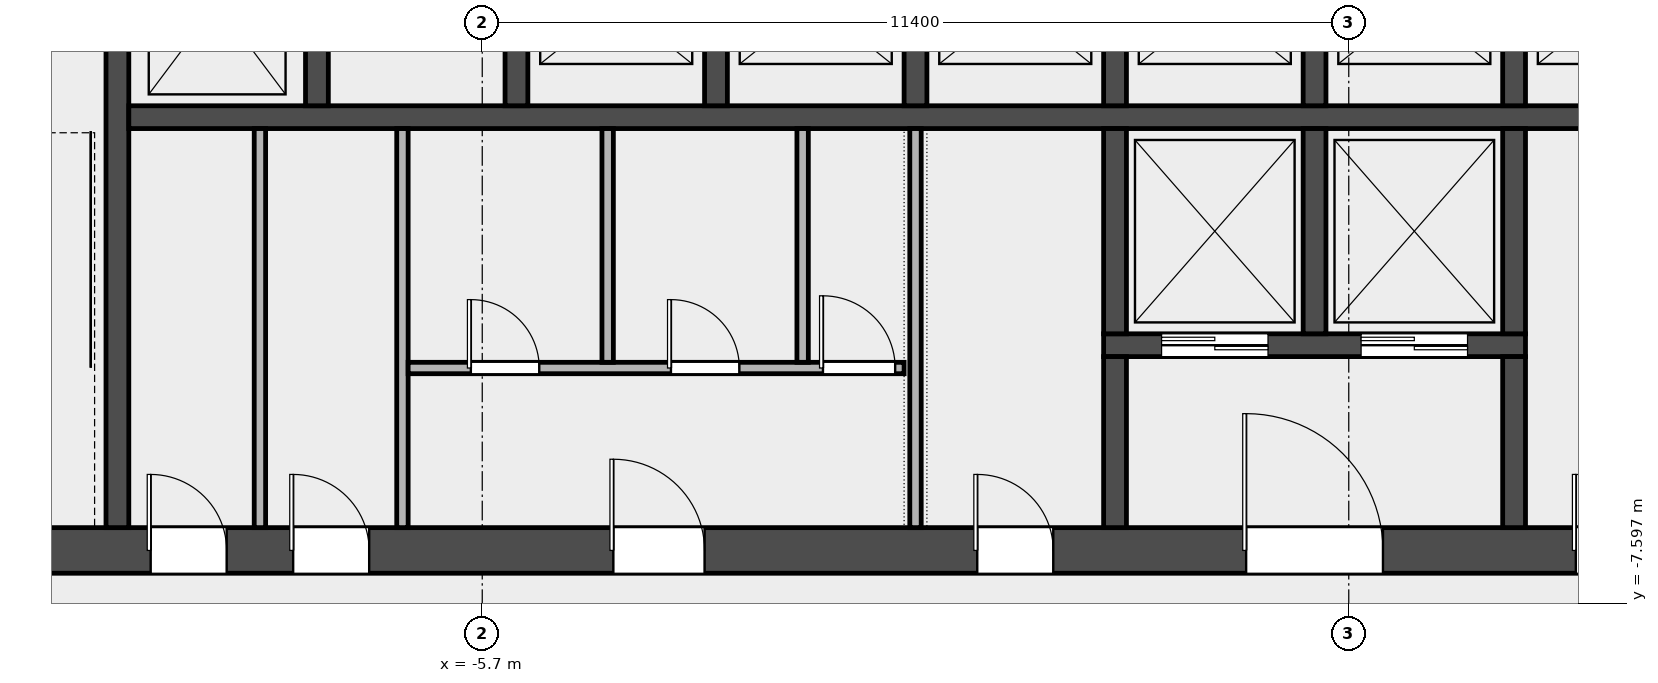
"""IFC4 building model, lengths in metres.
Left out: names, types, materials, properties, quantities, classifications, styles, units other than length and angle.
Written with IfcOpenShell. Run it as: python <this file> out.ifc"""

import sys

from ifc_helpers import new_model, si_unit, direction, frame, frame_2d, origin, place, context, subcontext, project, spatial, rectangle, extrude, element, fill, save


model = new_model("IFC4")
c1 = context("Model", 3, precision=1e-05, world=origin(), true_north=direction((0.0, 1.0)))
c2 = subcontext(c1, "Body", "Model", "MODEL_VIEW")
j1 = project(units=[si_unit("LENGTHUNIT", "METRE"), si_unit("PLANEANGLEUNIT", "RADIAN")], contexts=[c1])
p1 = place(None, origin())
s1 = spatial("IfcSite", under=j1, at=p1, CompositionType="ELEMENT")
p2 = place(p1, origin())
s2 = spatial("IfcBuilding", under=s1, at=p2, CompositionType="ELEMENT")
p3 = place(p2, frame((0.0, 0.0, 148.6)))
s3 = spatial("IfcBuildingStorey", under=s2, at=p3, CompositionType="ELEMENT", Elevation=148.6)
p4 = place(p3, frame((-14.4, -6.9, 0.0), z_axis=(0.0, 0.0, 1.0), x_axis=(1.0, 0.0, 0.0)))
e1 = element("IfcWall", 1, at=p4, inside=s3, PredefinedType="SHEAR", context=c2, shape_type="SweptSolid", body=[
    extrude(rectangle(XDim=28.8, YDim=0.6, at=frame_2d((14.4, 0.0))), origin(), (0.0, 0.0, 1.0), 8.1),
])
p5 = place(p4, frame((4.337, 0.0, 0.0)))
e2 = element("IfcOpeningElement", 2, at=p5, cuts=e1, PredefinedType="OPENING", context=c2, shape_type="SweptSolid", body=[
    extrude(rectangle(XDim=1.0, YDim=2.1, at=frame_2d((0.5, 1.05))), frame((0.0, 0.312, 0.0), z_axis=(0.0, -1.0, 0.0), x_axis=(1.0, 0.0, 0.0)), (0.0, 0.0, 1.0), 0.624),
])
p6 = place(p4, frame((6.212, 0.0, 0.0)))
e3 = element("IfcOpeningElement", 3, at=p6, cuts=e1, PredefinedType="OPENING", context=c2, shape_type="SweptSolid", body=[
    extrude(rectangle(XDim=1.0, YDim=2.1, at=frame_2d((0.5, 1.05))), frame((0.0, 0.312, 0.0), z_axis=(0.0, -1.0, 0.0), x_axis=(1.0, 0.0, 0.0)), (0.0, 0.0, 1.0), 0.624),
])
p7 = place(p4, frame((10.425, 0.0, 0.0)))
e4 = element("IfcOpeningElement", 4, at=p7, cuts=e1, PredefinedType="OPENING", context=c2, shape_type="SweptSolid", body=[
    extrude(rectangle(XDim=1.2, YDim=2.1, at=frame_2d((0.6, 1.05))), frame((0.0, 0.312, 0.0), z_axis=(0.0, -1.0, 0.0), x_axis=(1.0, 0.0, 0.0)), (0.0, 0.0, 1.0), 0.624),
])
p8 = place(p4, frame((15.212, 0.0, 0.0)))
e5 = element("IfcOpeningElement", 5, at=p8, cuts=e1, PredefinedType="OPENING", context=c2, shape_type="SweptSolid", body=[
    extrude(rectangle(XDim=1.0, YDim=2.1, at=frame_2d((0.5, 1.05))), frame((0.0, 0.312, 0.0), z_axis=(0.0, -1.0, 0.0), x_axis=(1.0, 0.0, 0.0)), (0.0, 0.0, 1.0), 0.624),
])
p9 = place(p4, frame((18.75, 0.0, 0.0)))
e6 = element("IfcOpeningElement", 6, at=p9, cuts=e1, PredefinedType="OPENING", context=c2, shape_type="SweptSolid", body=[
    extrude(rectangle(XDim=1.8, YDim=2.1, at=frame_2d((0.9, 1.05))), frame((0.0, 0.312, 0.0), z_axis=(0.0, -1.0, 0.0), x_axis=(1.0, 0.0, 0.0)), (0.0, 0.0, 1.0), 0.624),
])
p10 = place(p4, frame((23.087, 0.0, 0.0)))
e7 = element("IfcOpeningElement", 7, at=p10, cuts=e1, PredefinedType="OPENING", context=c2, shape_type="SweptSolid", body=[
    extrude(rectangle(XDim=1.0, YDim=2.1, at=frame_2d((0.5, 1.05))), frame((0.0, 0.312, 0.0), z_axis=(0.0, -1.0, 0.0), x_axis=(1.0, 0.0, 0.0)), (0.0, 0.0, 1.0), 0.624),
])
p11 = place(p3, frame((-10.5, -6.6, 0.0), z_axis=(0.0, 0.0, 1.0), x_axis=(0.0, 1.0, 0.0)))
e8 = element("IfcWall", 8, at=p11, inside=s3, PredefinedType="SHEAR", context=c2, shape_type="SweptSolid", body=[
    extrude(rectangle(XDim=8.55, YDim=0.3, at=frame_2d((4.275, 0.0))), origin(), (0.0, 0.0, 1.0), 8.1),
])
p12 = place(p3, frame((-10.35, -1.2, 0.0), z_axis=(0.0, 0.0, 1.0), x_axis=(1.0, 0.0, 0.0)))
e9 = element("IfcWall", 9, at=p12, inside=s3, PredefinedType="SOLIDWALL", context=c2, shape_type="SweptSolid", body=[
    extrude(rectangle(XDim=20.7, YDim=0.3, at=frame_2d((10.35, 0.0))), origin(), (0.0, 0.0, 1.0), 8.1),
])
for number, where, z_axis, x_axis in (
    (10, (-7.875, -1.05, 0.0), (0.0, 0.0, 1.0), (0.0, 1.0, 0.0)),
    (11, (-5.25, -1.05, 0.0), (0.0, 0.0, 1.0), (0.0, 1.0, 0.0)),
    (12, (-2.625, -1.05, 0.0), (0.0, 0.0, 1.0), (0.0, 1.0, 0.0)),
    (13, (0.0, -1.05, 0.0), (0.0, 0.0, 1.0), (0.0, 1.0, 0.0)),
    (14, (2.625, -1.05, 0.0), (0.0, 0.0, 1.0), (0.0, 1.0, 0.0)),
    (15, (5.25, -1.05, 0.0), (0.0, 0.0, 1.0), (0.0, 1.0, 0.0)),
    (16, (7.875, -1.05, 0.0), (0.0, 0.0, 1.0), (0.0, 1.0, 0.0)),
):
    element("IfcWall", number, at=place(p3, frame(where, z_axis=z_axis, x_axis=x_axis)), inside=s3, PredefinedType="SOLIDWALL", context=c2, shape_type="SweptSolid", body=[
        extrude(rectangle(XDim=2.7, YDim=0.3, at=frame_2d((1.35, 0.0))), origin(), (0.0, 0.0, 1.0), 8.1),
    ])
p13 = place(p3, frame((2.475, -4.2, 0.0), z_axis=(0.0, 0.0, 1.0), x_axis=(1.0, 0.0, 0.0)))
e17 = element("IfcWall", 17, at=p13, inside=s3, PredefinedType="SOLIDWALL", context=c2, shape_type="SweptSolid", body=[
    extrude(rectangle(XDim=5.55, YDim=0.3, at=frame_2d((2.775, 0.0))), origin(), (0.0, 0.0, 1.0), 8.1),
])
p14 = place(p13, frame((0.762, 0.0, 0.0)))
e18 = element("IfcOpeningElement", 18, at=p14, cuts=e17, PredefinedType="OPENING", context=c2, shape_type="SweptSolid", body=[
    extrude(rectangle(XDim=1.4, YDim=2.1, at=frame_2d((0.7, 1.05))), frame((0.0, 0.162, 0.0), z_axis=(0.0, -1.0, 0.0), x_axis=(1.0, 0.0, 0.0)), (0.0, 0.0, 1.0), 0.324),
])
p15 = place(p13, frame((3.387, 0.0, 0.0)))
e19 = element("IfcOpeningElement", 19, at=p15, cuts=e17, PredefinedType="OPENING", context=c2, shape_type="SweptSolid", body=[
    extrude(rectangle(XDim=1.4, YDim=2.1, at=frame_2d((0.7, 1.05))), frame((0.0, 0.162, 0.0), z_axis=(0.0, -1.0, 0.0), x_axis=(1.0, 0.0, 0.0)), (0.0, 0.0, 1.0), 0.324),
])
p16 = place(p3, frame((2.625, -4.05, 0.0), z_axis=(0.0, 0.0, 1.0), x_axis=(0.0, 1.0, 0.0)))
e20 = element("IfcWall", 20, at=p16, inside=s3, PredefinedType="SOLIDWALL", context=c2, shape_type="SweptSolid", body=[
    extrude(rectangle(XDim=2.7, YDim=0.3, at=frame_2d((1.35, 0.0))), origin(), (0.0, 0.0, 1.0), 8.1),
])
p17 = place(p3, frame((2.625, -6.6, 0.0), z_axis=(0.0, 0.0, 1.0), x_axis=(0.0, 1.0, 0.0)))
e21 = element("IfcWall", 21, at=p17, inside=s3, PredefinedType="SOLIDWALL", context=c2, shape_type="SweptSolid", body=[
    extrude(rectangle(XDim=2.25, YDim=0.3, at=frame_2d((1.125, 0.0))), origin(), (0.0, 0.0, 1.0), 8.1),
])
for number, where, z_axis, x_axis in (
    (22, (5.25, -4.05, 0.0), (0.0, 0.0, 1.0), (0.0, 1.0, 0.0)),
    (23, (7.875, -4.05, 0.0), (0.0, 0.0, 1.0), (0.0, 1.0, 0.0)),
):
    element("IfcWall", number, at=place(p3, frame(where, z_axis=z_axis, x_axis=x_axis)), inside=s3, PredefinedType="SOLIDWALL", context=c2, shape_type="SweptSolid", body=[
        extrude(rectangle(XDim=2.7, YDim=0.3, at=frame_2d((1.35, 0.0))), origin(), (0.0, 0.0, 1.0), 8.1),
    ])
p18 = place(p3, frame((7.875, -6.6, 0.0), z_axis=(0.0, 0.0, 1.0), x_axis=(0.0, 1.0, 0.0)))
e24 = element("IfcWall", 24, at=p18, inside=s3, PredefinedType="SOLIDWALL", context=c2, shape_type="SweptSolid", body=[
    extrude(rectangle(XDim=2.25, YDim=0.3, at=frame_2d((1.125, 0.0))), origin(), (0.0, 0.0, 1.0), 8.1),
])
for number, where, z_axis, x_axis in (
    (25, (-8.625, -6.6, 0.0), (0.0, 0.0, 1.0), (0.0, 1.0, 0.0)),
    (26, (-6.75, -6.6, 0.0), (0.0, 0.0, 1.0), (0.0, 1.0, 0.0)),
):
    element("IfcWall", number, at=place(p3, frame(where, z_axis=z_axis, x_axis=x_axis)), inside=s3, PredefinedType="PARTITIONING", context=c2, shape_type="SweptSolid", body=[
        extrude(rectangle(XDim=5.25, YDim=0.15, at=frame_2d((2.625, 0.0))), origin(), (0.0, 0.0, 1.0), 8.1),
    ])
p19 = place(p3, frame((-6.675, -4.5, 0.0), z_axis=(0.0, 0.0, 1.0), x_axis=(1.0, 0.0, 0.0)))
e27 = element("IfcWall", 27, at=p19, inside=s3, PredefinedType="PARTITIONING", context=c2, shape_type="SweptSolid", body=[
    extrude(rectangle(XDim=6.525, YDim=0.15, at=frame_2d((3.263, 0.0))), origin(), (0.0, 0.0, 1.0), 8.1),
])
p20 = place(p19, frame((0.825, 0.0, 0.0)))
e28 = element("IfcOpeningElement", 28, at=p20, cuts=e27, PredefinedType="OPENING", context=c2, shape_type="SweptSolid", body=[
    extrude(rectangle(XDim=0.9, YDim=2.1, at=frame_2d((0.45, 1.05))), frame((0.0, 0.087, 0.0), z_axis=(0.0, -1.0, 0.0), x_axis=(1.0, 0.0, 0.0)), (0.0, 0.0, 1.0), 0.174),
])
p21 = place(p19, frame((3.458, 0.0, 0.0)))
e29 = element("IfcOpeningElement", 29, at=p21, cuts=e27, PredefinedType="OPENING", context=c2, shape_type="SweptSolid", body=[
    extrude(rectangle(XDim=0.9, YDim=2.1, at=frame_2d((0.45, 1.05))), frame((0.0, 0.087, 0.0), z_axis=(0.0, -1.0, 0.0), x_axis=(1.0, 0.0, 0.0)), (0.0, 0.0, 1.0), 0.174),
])
p22 = place(p19, frame((5.458, 0.0, 0.0)))
e30 = element("IfcOpeningElement", 30, at=p22, cuts=e27, PredefinedType="OPENING", context=c2, shape_type="SweptSolid", body=[
    extrude(rectangle(XDim=0.95, YDim=2.1, at=frame_2d((0.475, 1.05))), frame((0.0, 0.087, 0.0), z_axis=(0.0, -1.0, 0.0), x_axis=(1.0, 0.0, 0.0)), (0.0, 0.0, 1.0), 0.174),
])
for number, where, z_axis, x_axis in (
    (31, (-4.05, -4.425, 0.0), (0.0, 0.0, 1.0), (0.0, 1.0, 0.0)),
    (32, (-1.485, -4.425, 0.0), (0.0, 0.0, 1.0), (0.0, 1.0, 0.0)),
):
    element("IfcWall", number, at=place(p3, frame(where, z_axis=z_axis, x_axis=x_axis)), inside=s3, PredefinedType="PARTITIONING", context=c2, shape_type="SweptSolid", body=[
        extrude(rectangle(XDim=3.075, YDim=0.15, at=frame_2d((1.538, 0.0))), origin(), (0.0, 0.0, 1.0), 8.1),
    ])
p23 = place(p3, frame((0.0, -6.6, 0.0), z_axis=(0.0, 0.0, 1.0), x_axis=(0.0, 1.0, 0.0)))
e33 = element("IfcWall", 33, at=p23, inside=s3, PredefinedType="PARTITIONING", context=c2, shape_type="SweptSolid", body=[
    extrude(rectangle(XDim=5.25, YDim=0.15, at=frame_2d((2.625, 0.0))), origin(), (0.0, 0.0, 1.0), 8.1),
])
p24 = place(p14, origin())
e34 = element("IfcDoor", 34, at=p24, inside=s3, OperationType="DOUBLE_DOOR_SLIDING", PredefinedType="DOOR", context=c2, shape_type="SweptSolid", body=[
    extrude(rectangle(XDim=1.4, YDim=2.1, at=frame_2d((0.7, 1.05))), frame((0.0, 0.025, 0.0), z_axis=(0.0, -1.0, 0.0), x_axis=(1.0, 0.0, 0.0)), (0.0, 0.0, 1.0), 0.05),
])
fill(e18, e34)
p25 = place(p15, origin())
e35 = element("IfcDoor", 35, at=p25, inside=s3, OperationType="DOUBLE_DOOR_SLIDING", PredefinedType="DOOR", context=c2, shape_type="SweptSolid", body=[
    extrude(rectangle(XDim=1.4, YDim=2.1, at=frame_2d((0.7, 1.05))), frame((0.0, 0.025, 0.0), z_axis=(0.0, -1.0, 0.0), x_axis=(1.0, 0.0, 0.0)), (0.0, 0.0, 1.0), 0.05),
])
fill(e19, e35)
p26 = place(p5, origin())
e36 = element("IfcDoor", 36, at=p26, inside=s3, OperationType="SINGLE_SWING_LEFT", PredefinedType="DOOR", context=c2, shape_type="SweptSolid", body=[
    extrude(rectangle(XDim=1.0, YDim=2.1, at=frame_2d((0.5, 1.05))), frame((0.0, 0.025, 0.0), z_axis=(0.0, -1.0, 0.0), x_axis=(1.0, 0.0, 0.0)), (0.0, 0.0, 1.0), 0.05),
])
fill(e2, e36)
p27 = place(p6, origin())
e37 = element("IfcDoor", 37, at=p27, inside=s3, OperationType="SINGLE_SWING_LEFT", PredefinedType="DOOR", context=c2, shape_type="SweptSolid", body=[
    extrude(rectangle(XDim=1.0, YDim=2.1, at=frame_2d((0.5, 1.05))), frame((0.0, 0.025, 0.0), z_axis=(0.0, -1.0, 0.0), x_axis=(1.0, 0.0, 0.0)), (0.0, 0.0, 1.0), 0.05),
])
fill(e3, e37)
p28 = place(p7, origin())
e38 = element("IfcDoor", 38, at=p28, inside=s3, OperationType="SINGLE_SWING_LEFT", PredefinedType="DOOR", context=c2, shape_type="SweptSolid", body=[
    extrude(rectangle(XDim=1.2, YDim=2.1, at=frame_2d((0.6, 1.05))), frame((0.0, 0.025, 0.0), z_axis=(0.0, -1.0, 0.0), x_axis=(1.0, 0.0, 0.0)), (0.0, 0.0, 1.0), 0.05),
])
fill(e4, e38)
p29 = place(p20, origin())
e39 = element("IfcDoor", 39, at=p29, inside=s3, OperationType="SINGLE_SWING_LEFT", PredefinedType="DOOR", context=c2, shape_type="SweptSolid", body=[
    extrude(rectangle(XDim=0.9, YDim=2.1, at=frame_2d((0.45, 1.05))), frame((0.0, 0.025, 0.0), z_axis=(0.0, -1.0, 0.0), x_axis=(1.0, 0.0, 0.0)), (0.0, 0.0, 1.0), 0.05),
])
fill(e28, e39)
p30 = place(p21, origin())
e40 = element("IfcDoor", 40, at=p30, inside=s3, OperationType="SINGLE_SWING_LEFT", PredefinedType="DOOR", context=c2, shape_type="SweptSolid", body=[
    extrude(rectangle(XDim=0.9, YDim=2.1, at=frame_2d((0.45, 1.05))), frame((0.0, 0.025, 0.0), z_axis=(0.0, -1.0, 0.0), x_axis=(1.0, 0.0, 0.0)), (0.0, 0.0, 1.0), 0.05),
])
fill(e29, e40)
p31 = place(p22, origin())
e41 = element("IfcDoor", 41, at=p31, inside=s3, OperationType="SINGLE_SWING_LEFT", PredefinedType="DOOR", context=c2, shape_type="SweptSolid", body=[
    extrude(rectangle(XDim=0.95, YDim=2.1, at=frame_2d((0.475, 1.05))), frame((0.0, 0.025, 0.0), z_axis=(0.0, -1.0, 0.0), x_axis=(1.0, 0.0, 0.0)), (0.0, 0.0, 1.0), 0.05),
])
fill(e30, e41)
p32 = place(p8, origin())
e42 = element("IfcDoor", 42, at=p32, inside=s3, OperationType="SINGLE_SWING_LEFT", PredefinedType="DOOR", context=c2, shape_type="SweptSolid", body=[
    extrude(rectangle(XDim=1.0, YDim=2.1, at=frame_2d((0.5, 1.05))), frame((0.0, 0.025, 0.0), z_axis=(0.0, -1.0, 0.0), x_axis=(1.0, 0.0, 0.0)), (0.0, 0.0, 1.0), 0.05),
])
fill(e5, e42)
p33 = place(p9, origin())
e43 = element("IfcDoor", 43, at=p33, inside=s3, OperationType="DOUBLE_DOOR_SINGLE_SWING", PredefinedType="DOOR", context=c2, shape_type="SweptSolid", body=[
    extrude(rectangle(XDim=1.8, YDim=2.1, at=frame_2d((0.9, 1.05))), frame((0.0, 0.025, 0.0), z_axis=(0.0, -1.0, 0.0), x_axis=(1.0, 0.0, 0.0)), (0.0, 0.0, 1.0), 0.05),
])
fill(e6, e43)
p34 = place(p10, origin())
e44 = element("IfcDoor", 44, at=p34, inside=s3, OperationType="SINGLE_SWING_LEFT", PredefinedType="DOOR", context=c2, shape_type="SweptSolid", body=[
    extrude(rectangle(XDim=1.0, YDim=2.1, at=frame_2d((0.5, 1.05))), frame((0.0, 0.025, 0.0), z_axis=(0.0, -1.0, 0.0), x_axis=(1.0, 0.0, 0.0)), (0.0, 0.0, 1.0), 0.05),
])
fill(e7, e44)
save(model, sys.argv[1])
